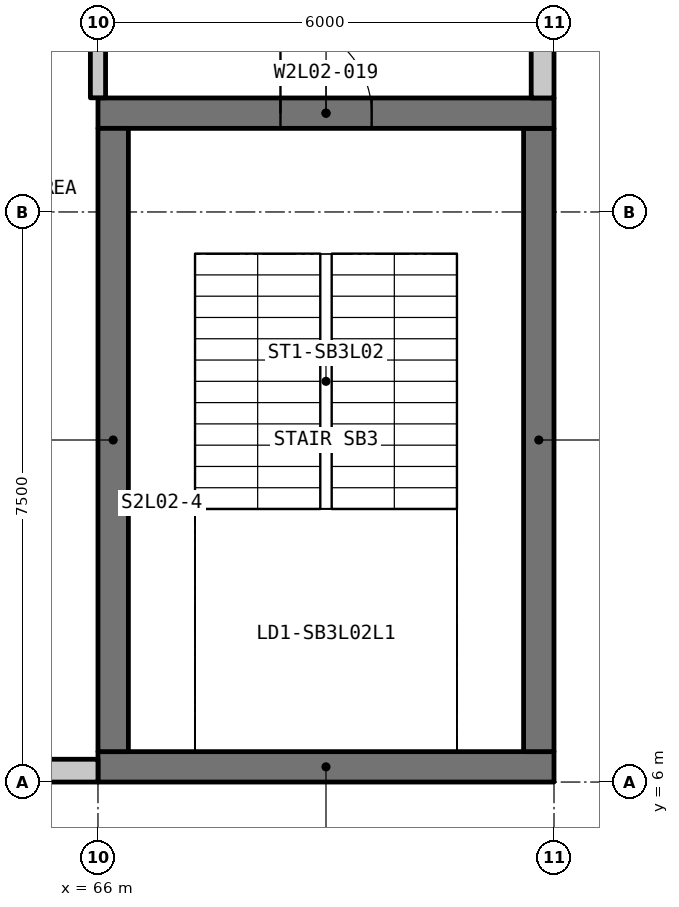
"""IFC4 building model, lengths in metres.
Left out: names, types, materials, properties, quantities, classifications, styles, units other than length and angle.
Written with IfcOpenShell. Run it as: python <this file> out.ifc"""

import sys

from ifc_helpers import new_model, si_unit, direction, frame, frame_2d, origin, place, context, subcontext, project, spatial, rectangle, extrude, element, fill, save


model = new_model("IFC4")
c1 = context("Model", 3, precision=1e-05, world=origin(), true_north=direction((0.0, 1.0)))
c2 = subcontext(c1, "Body", "Model", "MODEL_VIEW")
j1 = project(units=[si_unit("LENGTHUNIT", "METRE"), si_unit("PLANEANGLEUNIT", "RADIAN")], contexts=[c1])
p1 = place(None, origin())
s1 = spatial("IfcSite", under=j1, at=p1, CompositionType="ELEMENT")
p2 = place(p1, origin())
s2 = spatial("IfcBuilding", under=s1, at=p2, CompositionType="ELEMENT")
p3 = place(p2, frame((0.0, 0.0, 11.25)))
s3 = spatial("IfcBuildingStorey", under=s2, at=p3, CompositionType="ELEMENT", Elevation=11.25)
p4 = place(p3, frame((66.0, 6.2, -0.3), z_axis=(0.0, 0.0, 1.0), x_axis=(1.0, 0.0, 0.0)))
e1 = element("IfcWall", 1, at=p4, inside=s3, PredefinedType="SHEAR", context=c2, shape_type="SweptSolid", body=[
    extrude(rectangle(XDim=6.0, YDim=0.4, at=frame_2d((3.0, 0.0))), origin(), (0.0, 0.0, 1.0), 4.5),
])
p5 = place(p3, frame((71.8, 6.4, -0.3), z_axis=(0.0, 0.0, 1.0), x_axis=(0.0, 1.0, 0.0)))
e2 = element("IfcWall", 2, at=p5, inside=s3, PredefinedType="SHEAR", context=c2, shape_type="SweptSolid", body=[
    extrude(rectangle(XDim=8.2, YDim=0.4, at=frame_2d((4.1, 0.0))), origin(), (0.0, 0.0, 1.0), 4.5),
])
p6 = place(p3, frame((66.0, 14.8, -0.3), z_axis=(0.0, 0.0, 1.0), x_axis=(1.0, 0.0, 0.0)))
e3 = element("IfcWall", 3, at=p6, inside=s3, PredefinedType="SHEAR", context=c2, shape_type="SweptSolid", body=[
    extrude(rectangle(XDim=6.0, YDim=0.4, at=frame_2d((3.0, 0.0))), origin(), (0.0, 0.0, 1.0), 4.5),
])
p7 = place(p6, frame((2.401, 0.0, 0.3)))
e4 = element("IfcOpeningElement", 4, at=p7, cuts=e3, PredefinedType="OPENING", context=c2, shape_type="SweptSolid", body=[
    extrude(rectangle(XDim=1.2, YDim=2.2, at=frame_2d((0.6, 1.1))), frame((0.0, 0.21, 0.0), z_axis=(0.0, -1.0, 0.0), x_axis=(1.0, 0.0, 0.0)), (0.0, 0.0, 1.0), 0.42),
])
p8 = place(p3, frame((66.2, 6.4, -0.3), z_axis=(0.0, 0.0, 1.0), x_axis=(0.0, 1.0, 0.0)))
e5 = element("IfcWall", 5, at=p8, inside=s3, PredefinedType="SHEAR", context=c2, shape_type="SweptSolid", body=[
    extrude(rectangle(XDim=8.2, YDim=0.4, at=frame_2d((4.1, 0.0))), origin(), (0.0, 0.0, 1.0), 4.5),
])
p9 = place(p3, frame((66.0, 6.15, 0.0), z_axis=(0.0, 0.0, 1.0), x_axis=(-1.0, 0.0, 0.0)))
e6 = element("IfcWall", 6, at=p9, inside=s3, PredefinedType="SOLIDWALL", context=c2, shape_type="SweptSolid", body=[
    extrude(rectangle(XDim=5.6, YDim=0.3, at=frame_2d((2.8, 0.0))), origin(), (0.0, 0.0, 1.0), 3.86),
])
p10 = place(p3, frame((71.85, 16.6, 0.0), z_axis=(0.0, 0.0, 1.0), x_axis=(0.0, -1.0, 0.0)))
e7 = element("IfcWall", 7, at=p10, inside=s3, PredefinedType="SOLIDWALL", context=c2, shape_type="SweptSolid", body=[
    extrude(rectangle(XDim=1.6, YDim=0.3, at=frame_2d((0.8, 0.0))), origin(), (0.0, 0.0, 1.0), 4.35),
])
p11 = place(p3, frame((66.0, 17.986, 0.0), z_axis=(0.0, 0.0, 1.0), x_axis=(0.0, -1.0, 0.0)))
e8 = element("IfcWall", 8, at=p11, inside=s3, PredefinedType="PARTITIONING", context=c2, shape_type="SweptSolid", body=[
    extrude(rectangle(XDim=2.984, YDim=0.2, at=frame_2d((1.492, 0.0))), origin(), (0.0, 0.0, 1.0), 3.75),
])
p12 = place(p11, frame((0.248, 0.0, 0.0)))
e9 = element("IfcOpeningElement", 9, at=p12, cuts=e8, PredefinedType="OPENING", context=c2, shape_type="SweptSolid", body=[
    extrude(rectangle(XDim=1.8, YDim=2.1, at=frame_2d((0.9, 1.05))), frame((0.0, 0.11, 0.0), z_axis=(0.0, -1.0, 0.0), x_axis=(1.0, 0.0, 0.0)), (0.0, 0.0, 1.0), 0.22),
])
p13 = place(p7, origin())
e10 = element("IfcDoor", 10, at=p13, inside=s3, OperationType="SINGLE_SWING_RIGHT", PredefinedType="DOOR", context=c2, shape_type="SweptSolid", body=[
    extrude(rectangle(XDim=1.2, YDim=2.2, at=frame_2d((0.6, 1.1))), frame((0.0, 0.025, 0.0), z_axis=(0.0, -1.0, 0.0), x_axis=(1.0, 0.0, 0.0)), (0.0, 0.0, 1.0), 0.05),
])
fill(e4, e10)
save(model, sys.argv[1])
